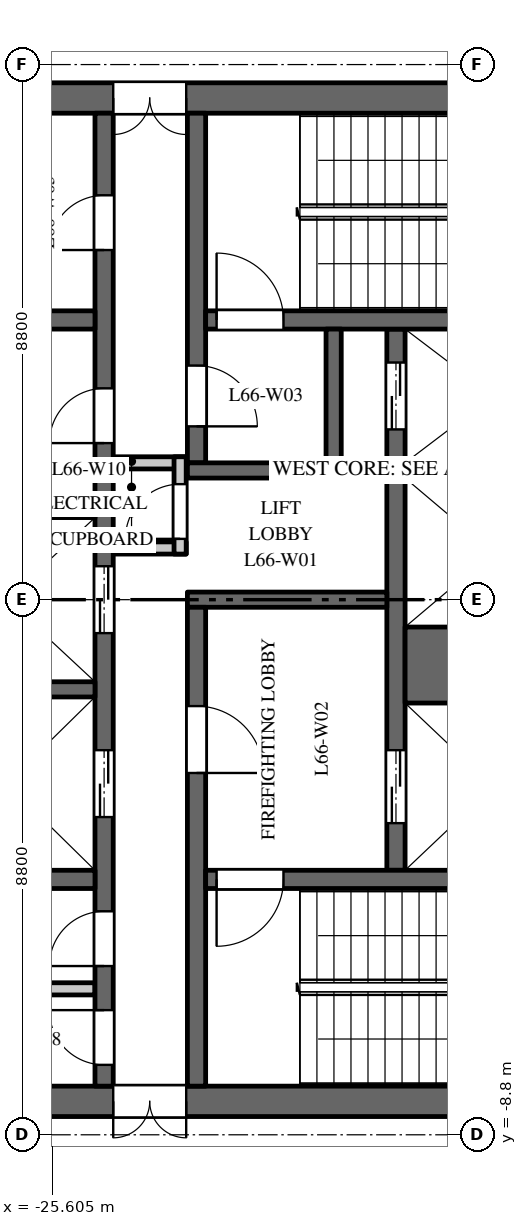
"""IFC4 building model, lengths in metres.
Left out: names, types, materials, properties, quantities, classifications, styles, units other than length and angle.
Written with IfcOpenShell. Run it as: python <this file> out.ifc"""

import sys

from ifc_helpers import new_model, si_unit, direction, frame, frame_2d, origin, place, context, subcontext, project, spatial, rectangle, extrude, element, fill, save


model = new_model("IFC4")
c1 = context("Model", 3, precision=1e-05, world=origin(), true_north=direction((0.0, 1.0)))
c2 = subcontext(c1, "Body", "Model", "MODEL_VIEW")
j1 = project(units=[si_unit("LENGTHUNIT", "METRE"), si_unit("PLANEANGLEUNIT", "RADIAN")], contexts=[c1])
p1 = place(None, origin())
s1 = spatial("IfcSite", under=j1, at=p1, CompositionType="ELEMENT")
p2 = place(p1, origin())
s2 = spatial("IfcBuilding", under=s1, at=p2, CompositionType="ELEMENT")
p3 = place(p2, frame((0.0, 0.0, 307.0)))
s3 = spatial("IfcBuildingStorey", under=s2, at=p3, CompositionType="ELEMENT", Elevation=307.0)
p4 = place(p3, frame((-16.5, 8.25, 0.0), z_axis=(0.0, 0.0, 1.0), x_axis=(-1.0, 0.0, 0.0)))
e1 = element("IfcWall", 1, at=p4, inside=s3, PredefinedType="SHEAR", context=c2, shape_type="SweptSolid", body=[
    extrude(rectangle(XDim=15.0, YDim=0.5, at=frame_2d((7.5, 0.0))), origin(), (0.0, 0.0, 1.0), 3.7),
])
p5 = place(p4, frame((6.9, 0.0, 0.0)))
e2 = element("IfcOpeningElement", 2, at=p5, cuts=e1, PredefinedType="OPENING", context=c2, shape_type="SweptSolid", body=[
    extrude(rectangle(XDim=1.2, YDim=2.1, at=frame_2d((0.6, 1.05))), frame((0.0, 0.26, 0.0), z_axis=(0.0, -1.0, 0.0), x_axis=(1.0, 0.0, 0.0)), (0.0, 0.0, 1.0), 0.52),
])
p6 = place(p4, frame((12.425, 0.0, 0.0)))
e3 = element("IfcOpeningElement", 3, at=p6, cuts=e1, PredefinedType="OPENING", context=c2, shape_type="SweptSolid", body=[
    extrude(rectangle(XDim=0.9, YDim=2.1, at=frame_2d((0.45, 1.05))), frame((0.0, 0.26, 0.0), z_axis=(0.0, -1.0, 0.0), x_axis=(1.0, 0.0, 0.0)), (0.0, 0.0, 1.0), 0.52),
])
p7 = place(p3, frame((-16.5, -8.25, 0.0), z_axis=(0.0, 0.0, 1.0), x_axis=(-1.0, 0.0, 0.0)))
e4 = element("IfcWall", 4, at=p7, inside=s3, PredefinedType="SHEAR", context=c2, shape_type="SweptSolid", body=[
    extrude(rectangle(XDim=15.0, YDim=0.5, at=frame_2d((7.5, 0.0))), origin(), (0.0, 0.0, 1.0), 3.7),
])
p8 = place(p7, frame((6.9, 0.0, 0.0)))
e5 = element("IfcOpeningElement", 5, at=p8, cuts=e4, PredefinedType="OPENING", context=c2, shape_type="SweptSolid", body=[
    extrude(rectangle(XDim=1.2, YDim=2.1, at=frame_2d((0.6, 1.05))), frame((0.0, 0.26, 0.0), z_axis=(0.0, -1.0, 0.0), x_axis=(1.0, 0.0, 0.0)), (0.0, 0.0, 1.0), 0.52),
])
p9 = place(p7, frame((12.275, 0.0, 0.0)))
e6 = element("IfcOpeningElement", 6, at=p9, cuts=e4, PredefinedType="OPENING", context=c2, shape_type="SweptSolid", body=[
    extrude(rectangle(XDim=0.9, YDim=2.1, at=frame_2d((0.45, 1.05))), frame((0.0, 0.26, 0.0), z_axis=(0.0, -1.0, 0.0), x_axis=(1.0, 0.0, 0.0)), (0.0, 0.0, 1.0), 0.52),
])
p10 = place(p3, frame((-19.95, -4.45, 0.0), z_axis=(0.0, 0.0, 1.0), x_axis=(0.0, 1.0, 0.0)))
e7 = element("IfcWall", 7, at=p10, inside=s3, PredefinedType="SHEAR", context=c2, shape_type="SweptSolid", body=[
    extrude(rectangle(XDim=8.9, YDim=0.3, at=frame_2d((4.45, 0.0))), origin(), (0.0, 0.0, 1.0), 3.7),
])
p11 = place(p10, frame((0.775, 0.0, 0.0)))
e8 = element("IfcOpeningElement", 8, at=p11, cuts=e7, PredefinedType="OPENING", context=c2, shape_type="SweptSolid", body=[
    extrude(rectangle(XDim=1.2, YDim=2.1, at=frame_2d((0.6, 1.05))), frame((0.0, 0.16, 0.0), z_axis=(0.0, -1.0, 0.0), x_axis=(1.0, 0.0, 0.0)), (0.0, 0.0, 1.0), 0.32),
])
p12 = place(p10, frame((7.25, 0.0, 0.0)))
e9 = element("IfcOpeningElement", 9, at=p12, cuts=e7, PredefinedType="OPENING", context=c2, shape_type="SweptSolid", body=[
    extrude(rectangle(XDim=1.1, YDim=2.1, at=frame_2d((0.55, 1.05))), frame((0.0, 0.16, 0.0), z_axis=(0.0, -1.0, 0.0), x_axis=(1.0, 0.0, 0.0)), (0.0, 0.0, 1.0), 0.32),
])
p13 = place(p3, frame((-24.75, -8.0, 0.0), z_axis=(0.0, 0.0, 1.0), x_axis=(0.0, 1.0, 0.0)))
e10 = element("IfcWall", 10, at=p13, inside=s3, PredefinedType="SHEAR", context=c2, shape_type="SweptSolid", body=[
    extrude(rectangle(XDim=16.0, YDim=0.3, at=frame_2d((8.0, 0.0))), origin(), (0.0, 0.0, 1.0), 3.7),
])
p14 = place(p13, frame((4.425, 0.0, 0.0)))
e11 = element("IfcOpeningElement", 11, at=p14, cuts=e10, PredefinedType="OPENING", context=c2, shape_type="SweptSolid", body=[
    extrude(rectangle(XDim=1.1, YDim=2.1, at=frame_2d((0.55, 1.05))), frame((0.0, 0.16, 0.0), z_axis=(0.0, -1.0, 0.0), x_axis=(1.0, 0.0, 0.0)), (0.0, 0.0, 1.0), 0.32),
])
p15 = place(p13, frame((7.45, 0.0, 0.0)))
e12 = element("IfcOpeningElement", 12, at=p15, cuts=e10, PredefinedType="OPENING", context=c2, shape_type="SweptSolid", body=[
    extrude(rectangle(XDim=1.1, YDim=2.1, at=frame_2d((0.55, 1.05))), frame((0.0, 0.16, 0.0), z_axis=(0.0, -1.0, 0.0), x_axis=(1.0, 0.0, 0.0)), (0.0, 0.0, 1.0), 0.32),
])
p16 = place(p13, frame((10.575, 0.0, 0.0)))
e13 = element("IfcOpeningElement", 13, at=p16, cuts=e10, PredefinedType="OPENING", context=c2, shape_type="SweptSolid", body=[
    extrude(rectangle(XDim=0.9, YDim=2.1, at=frame_2d((0.45, 1.05))), frame((0.0, 0.16, 0.0), z_axis=(0.0, -1.0, 0.0), x_axis=(1.0, 0.0, 0.0)), (0.0, 0.0, 1.0), 0.32),
])
p17 = place(p13, frame((13.75, 0.0, 0.0)))
e14 = element("IfcOpeningElement", 14, at=p17, cuts=e10, PredefinedType="OPENING", context=c2, shape_type="SweptSolid", body=[
    extrude(rectangle(XDim=0.9, YDim=2.1, at=frame_2d((0.45, 1.05))), frame((0.0, 0.16, 0.0), z_axis=(0.0, -1.0, 0.0), x_axis=(1.0, 0.0, 0.0)), (0.0, 0.0, 1.0), 0.32),
])
p18 = place(p13, frame((1.975, 0.0, 0.0)))
e15 = element("IfcOpeningElement", 15, at=p18, cuts=e10, PredefinedType="OPENING", context=c2, shape_type="SweptSolid", body=[
    extrude(rectangle(XDim=0.9, YDim=2.1, at=frame_2d((0.45, 1.05))), frame((0.0, 0.16, 0.0), z_axis=(0.0, -1.0, 0.0), x_axis=(1.0, 0.0, 0.0)), (0.0, 0.0, 1.0), 0.32),
])
p19 = place(p13, frame((0.35, 0.0, 0.0)))
e16 = element("IfcOpeningElement", 16, at=p19, cuts=e10, PredefinedType="OPENING", context=c2, shape_type="SweptSolid", body=[
    extrude(rectangle(XDim=0.9, YDim=2.1, at=frame_2d((0.45, 1.05))), frame((0.0, 0.16, 0.0), z_axis=(0.0, -1.0, 0.0), x_axis=(1.0, 0.0, 0.0)), (0.0, 0.0, 1.0), 0.32),
])
p20 = place(p3, frame((-20.1, 0.0, 0.0), z_axis=(0.0, 0.0, 1.0), x_axis=(-1.0, 0.0, 0.0)))
e17 = element("IfcWall", 17, at=p20, inside=s3, PredefinedType="SHEAR", context=c2, shape_type="SweptSolid", body=[
    extrude(rectangle(XDim=3.28, YDim=0.25, at=frame_2d((1.64, 0.0))), origin(), (0.0, 0.0, 1.0), 3.7),
])
for number, where, z_axis, x_axis in (
    (18, (-23.4, 0.85, 0.0), (0.0, 0.0, 1.0), (-1.0, 0.0, 0.0)),
    (19, (-23.4, 2.25, 0.0), (0.0, 0.0, 1.0), (-1.0, 0.0, 0.0)),
):
    element("IfcWall", number, at=place(p3, frame(where, z_axis=z_axis, x_axis=x_axis)), inside=s3, PredefinedType="PARTITIONING", context=c2, shape_type="SweptSolid", body=[
        extrude(rectangle(XDim=1.2, YDim=0.2, at=frame_2d((0.6, 0.0))), origin(), (0.0, 0.0, 1.0), 3.7),
    ])
p21 = place(p3, frame((-23.5, 0.75, 0.0), z_axis=(0.0, 0.0, 1.0), x_axis=(0.0, 1.0, 0.0)))
e20 = element("IfcWall", 20, at=p21, inside=s3, PredefinedType="PARTITIONING", context=c2, shape_type="SweptSolid", body=[
    extrude(rectangle(XDim=1.6, YDim=0.2, at=frame_2d((0.8, 0.0))), origin(), (0.0, 0.0, 1.0), 3.7),
])
p22 = place(p21, frame((0.25, 0.0, 0.0)))
e21 = element("IfcOpeningElement", 21, at=p22, cuts=e20, PredefinedType="OPENING", context=c2, shape_type="SweptSolid", body=[
    extrude(rectangle(XDim=0.9, YDim=2.1, at=frame_2d((0.45, 1.05))), frame((0.0, 0.11, 0.0), z_axis=(0.0, -1.0, 0.0), x_axis=(1.0, 0.0, 0.0)), (0.0, 0.0, 1.0), 0.22),
])
p23 = place(p3, frame((-24.9, 4.6, 0.0), z_axis=(0.0, 0.0, 1.0), x_axis=(-1.0, 0.0, 0.0)))
e22 = element("IfcWall", 22, at=p23, inside=s3, PredefinedType="SHEAR", context=c2, shape_type="SweptSolid", body=[
    extrude(rectangle(XDim=6.1, YDim=0.3, at=frame_2d((3.05, 0.0))), origin(), (0.0, 0.0, 1.0), 3.7),
])
p24 = place(p3, frame((-24.9, -6.4, 0.0), z_axis=(0.0, 0.0, 1.0), x_axis=(-1.0, 0.0, 0.0)))
e23 = element("IfcWall", 23, at=p24, inside=s3, PredefinedType="PARTITIONING", context=c2, shape_type="SweptSolid", body=[
    extrude(rectangle(XDim=2.35, YDim=0.2, at=frame_2d((1.175, 0.0))), origin(), (0.0, 0.0, 1.0), 3.7),
])
p25 = place(p3, frame((-24.9, -4.6, 0.0), z_axis=(0.0, 0.0, 1.0), x_axis=(-1.0, 0.0, 0.0)))
e24 = element("IfcWall", 24, at=p25, inside=s3, PredefinedType="SHEAR", context=c2, shape_type="SweptSolid", body=[
    extrude(rectangle(XDim=6.1, YDim=0.3, at=frame_2d((3.05, 0.0))), origin(), (0.0, 0.0, 1.0), 3.7),
])
p26 = place(p25, frame((4.2, 0.0, 0.0)))
e25 = element("IfcOpeningElement", 25, at=p26, cuts=e24, PredefinedType="OPENING", context=c2, shape_type="SweptSolid", body=[
    extrude(rectangle(XDim=0.9, YDim=2.1, at=frame_2d((0.45, 1.05))), frame((0.0, 0.16, 0.0), z_axis=(0.0, -1.0, 0.0), x_axis=(1.0, 0.0, 0.0)), (0.0, 0.0, 1.0), 0.32),
])
p27 = place(p3, frame((-16.9, -1.075, 0.0), z_axis=(0.0, 0.0, 1.0), x_axis=(-1.0, 0.0, 0.0)))
e26 = element("IfcWall", 26, at=p27, inside=s3, PredefinedType="SHEAR", context=c2, shape_type="SweptSolid", body=[
    extrude(rectangle(XDim=2.9, YDim=1.25, at=frame_2d((1.45, 0.0))), origin(), (0.0, 0.0, 1.0), 3.7),
])
for number, where, z_axis, x_axis in (
    (27, (-16.9, 2.125, 0.0), (0.0, 0.0, 1.0), (-1.0, 0.0, 0.0)),
    (28, (-24.9, -1.475, 0.0), (0.0, 0.0, 1.0), (-1.0, 0.0, 0.0)),
    (29, (-24.9, 1.475, 0.0), (0.0, 0.0, 1.0), (-1.0, 0.0, 0.0)),
):
    element("IfcWall", number, at=place(p3, frame(where, z_axis=z_axis, x_axis=x_axis)), inside=s3, PredefinedType="SHEAR", context=c2, shape_type="SweptSolid", body=[
        extrude(rectangle(XDim=2.9, YDim=0.25, at=frame_2d((1.45, 0.0))), origin(), (0.0, 0.0, 1.0), 3.7),
    ])
p28 = place(p3, frame((-23.23, 2.25, 0.0), z_axis=(0.0, 0.0, 1.0), x_axis=(0.0, 1.0, 0.0)))
e30 = element("IfcWall", 30, at=p28, inside=s3, PredefinedType="SHEAR", context=c2, shape_type="SweptSolid", body=[
    extrude(rectangle(XDim=5.75, YDim=0.3, at=frame_2d((2.875, 0.0))), origin(), (0.0, 0.0, 1.0), 3.7),
])
p29 = place(p28, frame((0.6, 0.0, 0.0)))
e31 = element("IfcOpeningElement", 31, at=p29, cuts=e30, PredefinedType="OPENING", context=c2, shape_type="SweptSolid", body=[
    extrude(rectangle(XDim=1.0, YDim=2.1, at=frame_2d((0.5, 1.05))), frame((0.0, 0.16, 0.0), z_axis=(0.0, -1.0, 0.0), x_axis=(1.0, 0.0, 0.0)), (0.0, 0.0, 1.0), 0.32),
])
p30 = place(p3, frame((-23.23, -8.0, 0.0), z_axis=(0.0, 0.0, 1.0), x_axis=(0.0, 1.0, 0.0)))
e32 = element("IfcWall", 32, at=p30, inside=s3, PredefinedType="SHEAR", context=c2, shape_type="SweptSolid", body=[
    extrude(rectangle(XDim=7.875, YDim=0.3, at=frame_2d((3.938, 0.0))), origin(), (0.0, 0.0, 1.0), 3.7),
])
p31 = place(p30, frame((5.15, 0.0, 0.0)))
e33 = element("IfcOpeningElement", 33, at=p31, cuts=e32, PredefinedType="OPENING", context=c2, shape_type="SweptSolid", body=[
    extrude(rectangle(XDim=1.1, YDim=2.1, at=frame_2d((0.55, 1.05))), frame((0.0, 0.16, 0.0), z_axis=(0.0, -1.0, 0.0), x_axis=(1.0, 0.0, 0.0)), (0.0, 0.0, 1.0), 0.32),
])
p32 = place(p3, frame((-16.9, 4.6, 0.0), z_axis=(0.0, 0.0, 1.0), x_axis=(-1.0, 0.0, 0.0)))
e34 = element("IfcWall", 34, at=p32, inside=s3, PredefinedType="SHEAR", context=c2, shape_type="SweptSolid", body=[
    extrude(rectangle(XDim=6.18, YDim=0.3, at=frame_2d((3.09, 0.0))), origin(), (0.0, 0.0, 1.0), 3.7),
])
p33 = place(p32, frame((4.9, 0.0, 0.0)))
e35 = element("IfcOpeningElement", 35, at=p33, cuts=e34, PredefinedType="OPENING", context=c2, shape_type="SweptSolid", body=[
    extrude(rectangle(XDim=1.1, YDim=2.1, at=frame_2d((0.55, 1.05))), frame((0.0, 0.16, 0.0), z_axis=(0.0, -1.0, 0.0), x_axis=(1.0, 0.0, 0.0)), (0.0, 0.0, 1.0), 0.32),
])
p34 = place(p3, frame((-16.9, -4.6, 0.0), z_axis=(0.0, 0.0, 1.0), x_axis=(-1.0, 0.0, 0.0)))
e36 = element("IfcWall", 36, at=p34, inside=s3, PredefinedType="SHEAR", context=c2, shape_type="SweptSolid", body=[
    extrude(rectangle(XDim=6.18, YDim=0.3, at=frame_2d((3.09, 0.0))), origin(), (0.0, 0.0, 1.0), 3.7),
])
p35 = place(p34, frame((4.9, 0.0, 0.0)))
e37 = element("IfcOpeningElement", 37, at=p35, cuts=e36, PredefinedType="OPENING", context=c2, shape_type="SweptSolid", body=[
    extrude(rectangle(XDim=1.1, YDim=2.1, at=frame_2d((0.55, 1.05))), frame((0.0, 0.16, 0.0), z_axis=(0.0, -1.0, 0.0), x_axis=(1.0, 0.0, 0.0)), (0.0, 0.0, 1.0), 0.32),
])
p36 = place(p3, frame((-20.85, 2.125, 0.0), z_axis=(0.0, 0.0, 1.0), x_axis=(-1.0, 0.0, 0.0)))
e38 = element("IfcWall", 38, at=p36, inside=s3, PredefinedType="SHEAR", context=c2, shape_type="SweptSolid", body=[
    extrude(rectangle(XDim=2.53, YDim=0.25, at=frame_2d((1.265, 0.0))), origin(), (0.0, 0.0, 1.0), 3.7),
])
p37 = place(p3, frame((-20.975, 2.25, 0.0), z_axis=(0.0, 0.0, 1.0), x_axis=(0.0, 1.0, 0.0)))
e39 = element("IfcWall", 39, at=p37, inside=s3, PredefinedType="SHEAR", context=c2, shape_type="SweptSolid", body=[
    extrude(rectangle(XDim=2.2, YDim=0.25, at=frame_2d((1.1, 0.0))), origin(), (0.0, 0.0, 1.0), 3.7),
])
p38 = place(p11, origin())
e40 = element("IfcDoor", 40, at=p38, inside=s3, OperationType="DOUBLE_DOOR_SLIDING", PredefinedType="DOOR", context=c2, shape_type="SweptSolid", body=[
    extrude(rectangle(XDim=1.2, YDim=2.1, at=frame_2d((0.6, 1.05))), frame((0.0, 0.025, 0.0), z_axis=(0.0, -1.0, 0.0), x_axis=(1.0, 0.0, 0.0)), (0.0, 0.0, 1.0), 0.05),
])
fill(e8, e40)
p39 = place(p12, origin())
e41 = element("IfcDoor", 41, at=p39, inside=s3, OperationType="DOUBLE_DOOR_SLIDING", PredefinedType="DOOR", context=c2, shape_type="SweptSolid", body=[
    extrude(rectangle(XDim=1.1, YDim=2.1, at=frame_2d((0.55, 1.05))), frame((0.0, 0.025, 0.0), z_axis=(0.0, -1.0, 0.0), x_axis=(1.0, 0.0, 0.0)), (0.0, 0.0, 1.0), 0.05),
])
fill(e9, e41)
p40 = place(p14, origin())
e42 = element("IfcDoor", 42, at=p40, inside=s3, OperationType="DOUBLE_DOOR_SLIDING", PredefinedType="DOOR", context=c2, shape_type="SweptSolid", body=[
    extrude(rectangle(XDim=1.1, YDim=2.1, at=frame_2d((0.55, 1.05))), frame((0.0, 0.025, 0.0), z_axis=(0.0, -1.0, 0.0), x_axis=(1.0, 0.0, 0.0)), (0.0, 0.0, 1.0), 0.05),
])
fill(e11, e42)
p41 = place(p15, origin())
e43 = element("IfcDoor", 43, at=p41, inside=s3, OperationType="DOUBLE_DOOR_SLIDING", PredefinedType="DOOR", context=c2, shape_type="SweptSolid", body=[
    extrude(rectangle(XDim=1.1, YDim=2.1, at=frame_2d((0.55, 1.05))), frame((0.0, 0.025, 0.0), z_axis=(0.0, -1.0, 0.0), x_axis=(1.0, 0.0, 0.0)), (0.0, 0.0, 1.0), 0.05),
])
fill(e12, e43)
p42 = place(p33, origin())
e44 = element("IfcDoor", 44, at=p42, inside=s3, OperationType="SINGLE_SWING_RIGHT", PredefinedType="DOOR", context=c2, shape_type="SweptSolid", body=[
    extrude(rectangle(XDim=1.1, YDim=2.1, at=frame_2d((0.55, 1.05))), frame((0.0, 0.025, 0.0), z_axis=(0.0, -1.0, 0.0), x_axis=(1.0, 0.0, 0.0)), (0.0, 0.0, 1.0), 0.05),
])
fill(e35, e44)
p43 = place(p35, origin())
e45 = element("IfcDoor", 45, at=p43, inside=s3, OperationType="SINGLE_SWING_LEFT", PredefinedType="DOOR", context=c2, shape_type="SweptSolid", body=[
    extrude(rectangle(XDim=1.1, YDim=2.1, at=frame_2d((0.55, 1.05))), frame((0.0, 0.025, 0.0), z_axis=(0.0, -1.0, 0.0), x_axis=(1.0, 0.0, 0.0)), (0.0, 0.0, 1.0), 0.05),
])
fill(e37, e45)
p44 = place(p31, origin())
e46 = element("IfcDoor", 46, at=p44, inside=s3, OperationType="SINGLE_SWING_LEFT", PredefinedType="DOOR", context=c2, shape_type="SweptSolid", body=[
    extrude(rectangle(XDim=1.1, YDim=2.1, at=frame_2d((0.55, 1.05))), frame((0.0, 0.025, 0.0), z_axis=(0.0, -1.0, 0.0), x_axis=(1.0, 0.0, 0.0)), (0.0, 0.0, 1.0), 0.05),
])
fill(e33, e46)
p45 = place(p29, origin())
e47 = element("IfcDoor", 47, at=p45, inside=s3, OperationType="SINGLE_SWING_LEFT", PredefinedType="DOOR", context=c2, shape_type="SweptSolid", body=[
    extrude(rectangle(XDim=1.0, YDim=2.1, at=frame_2d((0.5, 1.05))), frame((0.0, 0.025, 0.0), z_axis=(0.0, -1.0, 0.0), x_axis=(1.0, 0.0, 0.0)), (0.0, 0.0, 1.0), 0.05),
])
fill(e31, e47)
p46 = place(p5, origin())
e48 = element("IfcDoor", 48, at=p46, inside=s3, OperationType="DOUBLE_DOOR_DOUBLE_SWING", PredefinedType="DOOR", context=c2, shape_type="SweptSolid", body=[
    extrude(rectangle(XDim=1.2, YDim=2.1, at=frame_2d((0.6, 1.05))), frame((0.0, 0.025, 0.0), z_axis=(0.0, -1.0, 0.0), x_axis=(1.0, 0.0, 0.0)), (0.0, 0.0, 1.0), 0.05),
])
fill(e2, e48)
p47 = place(p8, origin())
e49 = element("IfcDoor", 49, at=p47, inside=s3, OperationType="DOUBLE_DOOR_DOUBLE_SWING", PredefinedType="DOOR", context=c2, shape_type="SweptSolid", body=[
    extrude(rectangle(XDim=1.2, YDim=2.1, at=frame_2d((0.6, 1.05))), frame((0.0, 0.025, 0.0), z_axis=(0.0, -1.0, 0.0), x_axis=(1.0, 0.0, 0.0)), (0.0, 0.0, 1.0), 0.05),
])
fill(e5, e49)
p48 = place(p16, origin())
e50 = element("IfcDoor", 50, at=p48, inside=s3, OperationType="SINGLE_SWING_RIGHT", PredefinedType="DOOR", context=c2, shape_type="SweptSolid", body=[
    extrude(rectangle(XDim=0.9, YDim=2.1, at=frame_2d((0.45, 1.05))), frame((0.0, 0.025, 0.0), z_axis=(0.0, -1.0, 0.0), x_axis=(1.0, 0.0, 0.0)), (0.0, 0.0, 1.0), 0.05),
])
fill(e13, e50)
p49 = place(p17, origin())
e51 = element("IfcDoor", 51, at=p49, inside=s3, OperationType="SINGLE_SWING_RIGHT", PredefinedType="DOOR", context=c2, shape_type="SweptSolid", body=[
    extrude(rectangle(XDim=0.9, YDim=2.1, at=frame_2d((0.45, 1.05))), frame((0.0, 0.025, 0.0), z_axis=(0.0, -1.0, 0.0), x_axis=(1.0, 0.0, 0.0)), (0.0, 0.0, 1.0), 0.05),
])
fill(e14, e51)
p50 = place(p18, origin())
e52 = element("IfcDoor", 52, at=p50, inside=s3, OperationType="SINGLE_SWING_RIGHT", PredefinedType="DOOR", context=c2, shape_type="SweptSolid", body=[
    extrude(rectangle(XDim=0.9, YDim=2.1, at=frame_2d((0.45, 1.05))), frame((0.0, 0.025, 0.0), z_axis=(0.0, -1.0, 0.0), x_axis=(1.0, 0.0, 0.0)), (0.0, 0.0, 1.0), 0.05),
])
fill(e15, e52)
p51 = place(p19, origin())
e53 = element("IfcDoor", 53, at=p51, inside=s3, OperationType="SINGLE_SWING_LEFT", PredefinedType="DOOR", context=c2, shape_type="SweptSolid", body=[
    extrude(rectangle(XDim=0.9, YDim=2.1, at=frame_2d((0.45, 1.05))), frame((0.0, 0.025, 0.0), z_axis=(0.0, -1.0, 0.0), x_axis=(1.0, 0.0, 0.0)), (0.0, 0.0, 1.0), 0.05),
])
fill(e16, e53)
p52 = place(p22, origin())
e54 = element("IfcDoor", 54, at=p52, inside=s3, OperationType="SINGLE_SWING_RIGHT", PredefinedType="DOOR", context=c2, shape_type="SweptSolid", body=[
    extrude(rectangle(XDim=0.9, YDim=2.1, at=frame_2d((0.45, 1.05))), frame((0.0, 0.025, 0.0), z_axis=(0.0, -1.0, 0.0), x_axis=(1.0, 0.0, 0.0)), (0.0, 0.0, 1.0), 0.05),
])
fill(e21, e54)
save(model, sys.argv[1])
